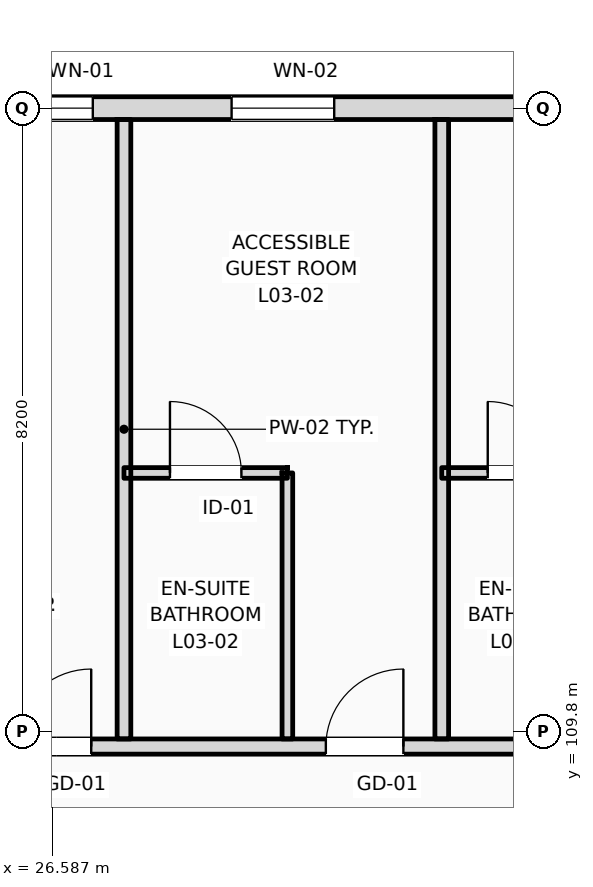
"""IFC4 building model, lengths in metres.
Left out: names, types, materials, properties, quantities, classifications, styles, units other than length and angle.
Written with IfcOpenShell. Run it as: python <this file> out.ifc"""

import sys

from ifc_helpers import new_model, si_unit, direction, frame, frame_2d, origin, place, context, subcontext, project, spatial, rectangle, extrude, element, fill, save


model = new_model("IFC4")
c1 = context("Model", 3, precision=1e-05, world=origin(), true_north=direction((0.0, 1.0)))
c2 = subcontext(c1, "Body", "Model", "MODEL_VIEW")
j1 = project(units=[si_unit("LENGTHUNIT", "METRE"), si_unit("PLANEANGLEUNIT", "RADIAN")], contexts=[c1])
p1 = place(None, origin())
s1 = spatial("IfcSite", under=j1, at=p1, CompositionType="ELEMENT")
p2 = place(p1, origin())
s2 = spatial("IfcBuilding", under=s1, at=p2, CompositionType="ELEMENT")
p3 = place(p2, frame((0.0, 0.0, 16.2)))
s3 = spatial("IfcBuildingStorey", under=s2, at=p3, CompositionType="ELEMENT", Elevation=16.2)
p4 = place(p3, frame((22.5, 118.0, 0.0), z_axis=(0.0, 0.0, 1.0), x_axis=(1.0, 0.0, 0.0)))
e1 = element("IfcWall", 1, at=p4, inside=s3, PredefinedType="STANDARD", context=c2, shape_type="SweptSolid", body=[
    extrude(rectangle(XDim=97.5, YDim=0.3, at=frame_2d((48.75, 0.0))), origin(), (0.0, 0.0, 1.0), 3.36),
])
p5 = place(p4, frame((3.721, 0.0, 0.9)))
e2 = element("IfcOpeningElement", 2, at=p5, cuts=e1, PredefinedType="OPENING", context=c2, shape_type="SweptSolid", body=[
    extrude(rectangle(XDim=0.9, YDim=1.8, at=frame_2d((0.45, 0.9))), frame((0.0, 0.16, 0.0), z_axis=(0.0, -1.0, 0.0), x_axis=(1.0, 0.0, 0.0)), (0.0, 0.0, 1.0), 0.32),
])
p6 = place(p4, frame((6.447, 0.0, 0.9)))
e3 = element("IfcOpeningElement", 3, at=p6, cuts=e1, PredefinedType="OPENING", context=c2, shape_type="SweptSolid", body=[
    extrude(rectangle(XDim=1.35, YDim=1.85, at=frame_2d((0.675, 0.925))), frame((0.0, 0.16, 0.0), z_axis=(0.0, -1.0, 0.0), x_axis=(1.0, 0.0, 0.0)), (0.0, 0.0, 1.0), 0.32),
])
p7 = place(p4, frame((11.363, 0.0, 0.9)))
e4 = element("IfcOpeningElement", 4, at=p7, cuts=e1, PredefinedType="OPENING", context=c2, shape_type="SweptSolid", body=[
    extrude(rectangle(XDim=1.5, YDim=1.9, at=frame_2d((0.75, 0.95))), frame((0.0, 0.16, 0.0), z_axis=(0.0, -1.0, 0.0), x_axis=(1.0, 0.0, 0.0)), (0.0, 0.0, 1.0), 0.32),
])
p8 = place(p4, frame((15.078, 0.0, 0.9)))
e5 = element("IfcOpeningElement", 5, at=p8, cuts=e1, PredefinedType="OPENING", context=c2, shape_type="SweptSolid", body=[
    extrude(rectangle(XDim=1.65, YDim=1.95, at=frame_2d((0.825, 0.975))), frame((0.0, 0.16, 0.0), z_axis=(0.0, -1.0, 0.0), x_axis=(1.0, 0.0, 0.0)), (0.0, 0.0, 1.0), 0.32),
])
p9 = place(p4, frame((19.395, 0.0, 0.9)))
e6 = element("IfcOpeningElement", 6, at=p9, cuts=e1, PredefinedType="OPENING", context=c2, shape_type="SweptSolid", body=[
    extrude(rectangle(XDim=1.8, YDim=2.0, at=frame_2d((0.9, 1.0))), frame((0.0, 0.16, 0.0), z_axis=(0.0, -1.0, 0.0), x_axis=(1.0, 0.0, 0.0)), (0.0, 0.0, 1.0), 0.32),
])
p10 = place(p4, frame((23.31, 0.0, 0.9)))
e7 = element("IfcOpeningElement", 7, at=p10, cuts=e1, PredefinedType="OPENING", context=c2, shape_type="SweptSolid", body=[
    extrude(rectangle(XDim=1.95, YDim=2.05, at=frame_2d((0.975, 1.025))), frame((0.0, 0.16, 0.0), z_axis=(0.0, -1.0, 0.0), x_axis=(1.0, 0.0, 0.0)), (0.0, 0.0, 1.0), 0.32),
])
p11 = place(p4, frame((28.026, 0.0, 0.9)))
e8 = element("IfcOpeningElement", 8, at=p11, cuts=e1, PredefinedType="OPENING", context=c2, shape_type="SweptSolid", body=[
    extrude(rectangle(XDim=2.1, YDim=2.1, at=frame_2d((1.05, 1.05))), frame((0.0, 0.16, 0.0), z_axis=(0.0, -1.0, 0.0), x_axis=(1.0, 0.0, 0.0)), (0.0, 0.0, 1.0), 0.32),
])
p12 = place(p4, frame((31.941, 0.0, 0.9)))
e9 = element("IfcOpeningElement", 9, at=p12, cuts=e1, PredefinedType="OPENING", context=c2, shape_type="SweptSolid", body=[
    extrude(rectangle(XDim=1.1, YDim=2.15, at=frame_2d((0.55, 1.075))), frame((0.0, 0.16, 0.0), z_axis=(0.0, -1.0, 0.0), x_axis=(1.0, 0.0, 0.0)), (0.0, 0.0, 1.0), 0.32),
])
p13 = place(p4, frame((36.657, 0.0, 0.9)))
e10 = element("IfcOpeningElement", 10, at=p13, cuts=e1, PredefinedType="OPENING", context=c2, shape_type="SweptSolid", body=[
    extrude(rectangle(XDim=2.4, YDim=2.2, at=frame_2d((1.2, 1.1))), frame((0.0, 0.16, 0.0), z_axis=(0.0, -1.0, 0.0), x_axis=(1.0, 0.0, 0.0)), (0.0, 0.0, 1.0), 0.32),
])
p14 = place(p4, frame((42.574, 0.0, 0.9)))
e11 = element("IfcOpeningElement", 11, at=p14, cuts=e1, PredefinedType="OPENING", context=c2, shape_type="SweptSolid", body=[
    extrude(rectangle(XDim=1.35, YDim=2.25, at=frame_2d((0.675, 1.125))), frame((0.0, 0.16, 0.0), z_axis=(0.0, -1.0, 0.0), x_axis=(1.0, 0.0, 0.0)), (0.0, 0.0, 1.0), 0.32),
])
p15 = place(p4, frame((45.289, 0.0, 0.9)))
e12 = element("IfcOpeningElement", 12, at=p15, cuts=e1, PredefinedType="OPENING", context=c2, shape_type="SweptSolid", body=[
    extrude(rectangle(XDim=2.7, YDim=2.28, at=frame_2d((1.35, 1.14))), frame((0.0, 0.16, 0.0), z_axis=(0.0, -1.0, 0.0), x_axis=(1.0, 0.0, 0.0)), (0.0, 0.0, 1.0), 0.32),
])
p16 = place(p4, frame((50.406, 0.0, 0.9)))
e13 = element("IfcOpeningElement", 13, at=p16, cuts=e1, PredefinedType="OPENING", context=c2, shape_type="SweptSolid", body=[
    extrude(rectangle(XDim=1.8, YDim=2.28, at=frame_2d((0.9, 1.14))), frame((0.0, 0.16, 0.0), z_axis=(0.0, -1.0, 0.0), x_axis=(1.0, 0.0, 0.0)), (0.0, 0.0, 1.0), 0.32),
])
p17 = place(p4, frame((53.922, 0.0, 0.9)))
e14 = element("IfcOpeningElement", 14, at=p17, cuts=e1, PredefinedType="OPENING", context=c2, shape_type="SweptSolid", body=[
    extrude(rectangle(XDim=1.8, YDim=2.28, at=frame_2d((0.9, 1.14))), frame((0.0, 0.16, 0.0), z_axis=(0.0, -1.0, 0.0), x_axis=(1.0, 0.0, 0.0)), (0.0, 0.0, 1.0), 0.32),
])
p18 = place(p4, frame((58.332, 0.0, 0.9)))
e15 = element("IfcOpeningElement", 15, at=p18, cuts=e1, PredefinedType="OPENING", context=c2, shape_type="SweptSolid", body=[
    extrude(rectangle(XDim=2.961, YDim=2.28, at=frame_2d((1.48, 1.14))), frame((0.0, 0.16, 0.0), z_axis=(0.0, -1.0, 0.0), x_axis=(1.0, 0.0, 0.0)), (0.0, 0.0, 1.0), 0.32),
])
p19 = place(p4, frame((62.513, 0.0, 0.9)))
e16 = element("IfcOpeningElement", 16, at=p19, cuts=e1, PredefinedType="OPENING", context=c2, shape_type="SweptSolid", body=[
    extrude(rectangle(XDim=1.8, YDim=2.28, at=frame_2d((0.9, 1.14))), frame((0.0, 0.16, 0.0), z_axis=(0.0, -1.0, 0.0), x_axis=(1.0, 0.0, 0.0)), (0.0, 0.0, 1.0), 0.32),
])
p20 = place(p4, frame((67.114, 0.0, 0.9)))
e17 = element("IfcOpeningElement", 17, at=p20, cuts=e1, PredefinedType="OPENING", context=c2, shape_type="SweptSolid", body=[
    extrude(rectangle(XDim=2.961, YDim=2.28, at=frame_2d((1.48, 1.14))), frame((0.0, 0.16, 0.0), z_axis=(0.0, -1.0, 0.0), x_axis=(1.0, 0.0, 0.0)), (0.0, 0.0, 1.0), 0.32),
])
p21 = place(p4, frame((73.695, 0.0, 0.9)))
e18 = element("IfcOpeningElement", 18, at=p21, cuts=e1, PredefinedType="OPENING", context=c2, shape_type="SweptSolid", body=[
    extrude(rectangle(XDim=1.1, YDim=2.28, at=frame_2d((0.55, 1.14))), frame((0.0, 0.16, 0.0), z_axis=(0.0, -1.0, 0.0), x_axis=(1.0, 0.0, 0.0)), (0.0, 0.0, 1.0), 0.32),
])
p22 = place(p4, frame((75.895, 0.0, 0.9)))
e19 = element("IfcOpeningElement", 19, at=p22, cuts=e1, PredefinedType="OPENING", context=c2, shape_type="SweptSolid", body=[
    extrude(rectangle(XDim=2.961, YDim=2.28, at=frame_2d((1.48, 1.14))), frame((0.0, 0.16, 0.0), z_axis=(0.0, -1.0, 0.0), x_axis=(1.0, 0.0, 0.0)), (0.0, 0.0, 1.0), 0.32),
])
p23 = place(p4, frame((81.676, 0.0, 0.9)))
e20 = element("IfcOpeningElement", 20, at=p23, cuts=e1, PredefinedType="OPENING", context=c2, shape_type="SweptSolid", body=[
    extrude(rectangle(XDim=1.8, YDim=2.28, at=frame_2d((0.9, 1.14))), frame((0.0, 0.16, 0.0), z_axis=(0.0, -1.0, 0.0), x_axis=(1.0, 0.0, 0.0)), (0.0, 0.0, 1.0), 0.32),
])
p24 = place(p4, frame((84.677, 0.0, 0.9)))
e21 = element("IfcOpeningElement", 21, at=p24, cuts=e1, PredefinedType="OPENING", context=c2, shape_type="SweptSolid", body=[
    extrude(rectangle(XDim=2.961, YDim=2.28, at=frame_2d((1.48, 1.14))), frame((0.0, 0.16, 0.0), z_axis=(0.0, -1.0, 0.0), x_axis=(1.0, 0.0, 0.0)), (0.0, 0.0, 1.0), 0.32),
])
p25 = place(p4, frame((89.999, 0.0, 0.9)))
e22 = element("IfcOpeningElement", 22, at=p25, cuts=e1, PredefinedType="OPENING", context=c2, shape_type="SweptSolid", body=[
    extrude(rectangle(XDim=1.1, YDim=1.5, at=frame_2d((0.55, 0.75))), frame((0.0, 0.16, 0.0), z_axis=(0.0, -1.0, 0.0), x_axis=(1.0, 0.0, 0.0)), (0.0, 0.0, 1.0), 0.32),
])
p26 = place(p4, frame((94.35, 0.0, 0.9)))
e23 = element("IfcOpeningElement", 23, at=p26, cuts=e1, PredefinedType="OPENING", context=c2, shape_type="SweptSolid", body=[
    extrude(rectangle(XDim=1.25, YDim=1.6, at=frame_2d((0.625, 0.8))), frame((0.0, 0.16, 0.0), z_axis=(0.0, -1.0, 0.0), x_axis=(1.0, 0.0, 0.0)), (0.0, 0.0, 1.0), 0.32),
])
p27 = place(p3, frame((10.65, 109.6, 0.0), z_axis=(0.0, 0.0, 1.0), x_axis=(1.0, 0.0, 0.0)))
e24 = element("IfcWall", 24, at=p27, inside=s3, PredefinedType="PARTITIONING", context=c2, shape_type="SweptSolid", body=[
    extrude(rectangle(XDim=109.21, YDim=0.2, at=frame_2d((54.605, 0.0))), origin(), (0.0, 0.0, 1.0), 3.36),
])
p28 = place(p27, frame((15.43, 0.0, 0.0)))
e25 = element("IfcOpeningElement", 25, at=p28, cuts=e24, PredefinedType="OPENING", context=c2, shape_type="SweptSolid", body=[
    extrude(rectangle(XDim=1.02, YDim=2.2, at=frame_2d((0.51, 1.1))), frame((0.0, 0.11, 0.0), z_axis=(0.0, -1.0, 0.0), x_axis=(1.0, 0.0, 0.0)), (0.0, 0.0, 1.0), 0.22),
])
p29 = place(p27, frame((19.537, 0.0, 0.0)))
e26 = element("IfcOpeningElement", 26, at=p29, cuts=e24, PredefinedType="OPENING", context=c2, shape_type="SweptSolid", body=[
    extrude(rectangle(XDim=1.02, YDim=2.2, at=frame_2d((0.51, 1.1))), frame((0.0, 0.11, 0.0), z_axis=(0.0, -1.0, 0.0), x_axis=(1.0, 0.0, 0.0)), (0.0, 0.0, 1.0), 0.22),
])
p30 = place(p27, frame((23.928, 0.0, 0.0)))
e27 = element("IfcOpeningElement", 27, at=p30, cuts=e24, PredefinedType="OPENING", context=c2, shape_type="SweptSolid", body=[
    extrude(rectangle(XDim=1.02, YDim=2.2, at=frame_2d((0.51, 1.1))), frame((0.0, 0.11, 0.0), z_axis=(0.0, -1.0, 0.0), x_axis=(1.0, 0.0, 0.0)), (0.0, 0.0, 1.0), 0.22),
])
p31 = place(p27, frame((26.169, 0.0, 0.0)))
e28 = element("IfcOpeningElement", 28, at=p31, cuts=e24, PredefinedType="OPENING", context=c2, shape_type="SweptSolid", body=[
    extrude(rectangle(XDim=1.02, YDim=2.2, at=frame_2d((0.51, 1.1))), frame((0.0, 0.11, 0.0), z_axis=(0.0, -1.0, 0.0), x_axis=(1.0, 0.0, 0.0)), (0.0, 0.0, 1.0), 0.22),
])
p32 = place(p27, frame((32.739, 0.0, 0.0)))
e29 = element("IfcOpeningElement", 29, at=p32, cuts=e24, PredefinedType="OPENING", context=c2, shape_type="SweptSolid", body=[
    extrude(rectangle(XDim=0.96, YDim=2.2, at=frame_2d((0.48, 1.1))), frame((0.0, 0.11, 0.0), z_axis=(0.0, -1.0, 0.0), x_axis=(1.0, 0.0, 0.0)), (0.0, 0.0, 1.0), 0.22),
])
p33 = place(p27, frame((34.98, 0.0, 0.0)))
e30 = element("IfcOpeningElement", 30, at=p33, cuts=e24, PredefinedType="OPENING", context=c2, shape_type="SweptSolid", body=[
    extrude(rectangle(XDim=0.96, YDim=2.2, at=frame_2d((0.48, 1.1))), frame((0.0, 0.11, 0.0), z_axis=(0.0, -1.0, 0.0), x_axis=(1.0, 0.0, 0.0)), (0.0, 0.0, 1.0), 0.22),
])
p34 = place(p27, frame((41.521, 0.0, 0.0)))
e31 = element("IfcOpeningElement", 31, at=p34, cuts=e24, PredefinedType="OPENING", context=c2, shape_type="SweptSolid", body=[
    extrude(rectangle(XDim=0.96, YDim=2.2, at=frame_2d((0.48, 1.1))), frame((0.0, 0.11, 0.0), z_axis=(0.0, -1.0, 0.0), x_axis=(1.0, 0.0, 0.0)), (0.0, 0.0, 1.0), 0.22),
])
p35 = place(p27, frame((43.512, 0.0, 0.0)))
e32 = element("IfcOpeningElement", 32, at=p35, cuts=e24, PredefinedType="OPENING", context=c2, shape_type="SweptSolid", body=[
    extrude(rectangle(XDim=0.96, YDim=2.2, at=frame_2d((0.48, 1.1))), frame((0.0, 0.11, 0.0), z_axis=(0.0, -1.0, 0.0), x_axis=(1.0, 0.0, 0.0)), (0.0, 0.0, 1.0), 0.22),
])
p36 = place(p27, frame((50.303, 0.0, 0.0)))
e33 = element("IfcOpeningElement", 33, at=p36, cuts=e24, PredefinedType="OPENING", context=c2, shape_type="SweptSolid", body=[
    extrude(rectangle(XDim=0.96, YDim=2.2, at=frame_2d((0.48, 1.1))), frame((0.0, 0.11, 0.0), z_axis=(0.0, -1.0, 0.0), x_axis=(1.0, 0.0, 0.0)), (0.0, 0.0, 1.0), 0.22),
])
p37 = place(p27, frame((54.944, 0.0, 0.0)))
e34 = element("IfcOpeningElement", 34, at=p37, cuts=e24, PredefinedType="OPENING", context=c2, shape_type="SweptSolid", body=[
    extrude(rectangle(XDim=0.96, YDim=2.2, at=frame_2d((0.48, 1.1))), frame((0.0, 0.11, 0.0), z_axis=(0.0, -1.0, 0.0), x_axis=(1.0, 0.0, 0.0)), (0.0, 0.0, 1.0), 0.22),
])
p38 = place(p27, frame((59.085, 0.0, 0.0)))
e35 = element("IfcOpeningElement", 35, at=p38, cuts=e24, PredefinedType="OPENING", context=c2, shape_type="SweptSolid", body=[
    extrude(rectangle(XDim=0.96, YDim=2.2, at=frame_2d((0.48, 1.1))), frame((0.0, 0.11, 0.0), z_axis=(0.0, -1.0, 0.0), x_axis=(1.0, 0.0, 0.0)), (0.0, 0.0, 1.0), 0.22),
])
p39 = place(p27, frame((63.476, 0.0, 0.0)))
e36 = element("IfcOpeningElement", 36, at=p39, cuts=e24, PredefinedType="OPENING", context=c2, shape_type="SweptSolid", body=[
    extrude(rectangle(XDim=0.96, YDim=2.2, at=frame_2d((0.48, 1.1))), frame((0.0, 0.11, 0.0), z_axis=(0.0, -1.0, 0.0), x_axis=(1.0, 0.0, 0.0)), (0.0, 0.0, 1.0), 0.22),
])
p40 = place(p27, frame((65.716, 0.0, 0.0)))
e37 = element("IfcOpeningElement", 37, at=p40, cuts=e24, PredefinedType="OPENING", context=c2, shape_type="SweptSolid", body=[
    extrude(rectangle(XDim=0.96, YDim=2.2, at=frame_2d((0.48, 1.1))), frame((0.0, 0.11, 0.0), z_axis=(0.0, -1.0, 0.0), x_axis=(1.0, 0.0, 0.0)), (0.0, 0.0, 1.0), 0.22),
])
p41 = place(p27, frame((72.257, 0.0, 0.0)))
e38 = element("IfcOpeningElement", 38, at=p41, cuts=e24, PredefinedType="OPENING", context=c2, shape_type="SweptSolid", body=[
    extrude(rectangle(XDim=0.96, YDim=2.2, at=frame_2d((0.48, 1.1))), frame((0.0, 0.11, 0.0), z_axis=(0.0, -1.0, 0.0), x_axis=(1.0, 0.0, 0.0)), (0.0, 0.0, 1.0), 0.22),
])
p42 = place(p27, frame((74.498, 0.0, 0.0)))
e39 = element("IfcOpeningElement", 39, at=p42, cuts=e24, PredefinedType="OPENING", context=c2, shape_type="SweptSolid", body=[
    extrude(rectangle(XDim=0.96, YDim=2.2, at=frame_2d((0.48, 1.1))), frame((0.0, 0.11, 0.0), z_axis=(0.0, -1.0, 0.0), x_axis=(1.0, 0.0, 0.0)), (0.0, 0.0, 1.0), 0.22),
])
p43 = place(p27, frame((81.039, 0.0, 0.0)))
e40 = element("IfcOpeningElement", 40, at=p43, cuts=e24, PredefinedType="OPENING", context=c2, shape_type="SweptSolid", body=[
    extrude(rectangle(XDim=0.96, YDim=2.2, at=frame_2d((0.48, 1.1))), frame((0.0, 0.11, 0.0), z_axis=(0.0, -1.0, 0.0), x_axis=(1.0, 0.0, 0.0)), (0.0, 0.0, 1.0), 0.22),
])
p44 = place(p27, frame((85.68, 0.0, 0.0)))
e41 = element("IfcOpeningElement", 41, at=p44, cuts=e24, PredefinedType="OPENING", context=c2, shape_type="SweptSolid", body=[
    extrude(rectangle(XDim=0.96, YDim=2.2, at=frame_2d((0.48, 1.1))), frame((0.0, 0.11, 0.0), z_axis=(0.0, -1.0, 0.0), x_axis=(1.0, 0.0, 0.0)), (0.0, 0.0, 1.0), 0.22),
])
p45 = place(p27, frame((89.82, 0.0, 0.0)))
e42 = element("IfcOpeningElement", 42, at=p45, cuts=e24, PredefinedType="OPENING", context=c2, shape_type="SweptSolid", body=[
    extrude(rectangle(XDim=0.96, YDim=2.2, at=frame_2d((0.48, 1.1))), frame((0.0, 0.11, 0.0), z_axis=(0.0, -1.0, 0.0), x_axis=(1.0, 0.0, 0.0)), (0.0, 0.0, 1.0), 0.22),
])
p46 = place(p27, frame((94.211, 0.0, 0.0)))
e43 = element("IfcOpeningElement", 43, at=p46, cuts=e24, PredefinedType="OPENING", context=c2, shape_type="SweptSolid", body=[
    extrude(rectangle(XDim=0.96, YDim=2.2, at=frame_2d((0.48, 1.1))), frame((0.0, 0.11, 0.0), z_axis=(0.0, -1.0, 0.0), x_axis=(1.0, 0.0, 0.0)), (0.0, 0.0, 1.0), 0.22),
])
p47 = place(p27, frame((98.602, 0.0, 0.0)))
e44 = element("IfcOpeningElement", 44, at=p47, cuts=e24, PredefinedType="OPENING", context=c2, shape_type="SweptSolid", body=[
    extrude(rectangle(XDim=0.96, YDim=2.2, at=frame_2d((0.48, 1.1))), frame((0.0, 0.11, 0.0), z_axis=(0.0, -1.0, 0.0), x_axis=(1.0, 0.0, 0.0)), (0.0, 0.0, 1.0), 0.22),
])
p48 = place(p27, frame((102.993, 0.0, 0.0)))
e45 = element("IfcOpeningElement", 45, at=p48, cuts=e24, PredefinedType="OPENING", context=c2, shape_type="SweptSolid", body=[
    extrude(rectangle(XDim=0.96, YDim=2.2, at=frame_2d((0.48, 1.1))), frame((0.0, 0.11, 0.0), z_axis=(0.0, -1.0, 0.0), x_axis=(1.0, 0.0, 0.0)), (0.0, 0.0, 1.0), 0.22),
])
p49 = place(p27, frame((105.269, 0.0, 0.0)))
e46 = element("IfcOpeningElement", 46, at=p49, cuts=e24, PredefinedType="OPENING", context=c2, shape_type="SweptSolid", body=[
    extrude(rectangle(XDim=0.96, YDim=2.2, at=frame_2d((0.48, 1.1))), frame((0.0, 0.11, 0.0), z_axis=(0.0, -1.0, 0.0), x_axis=(1.0, 0.0, 0.0)), (0.0, 0.0, 1.0), 0.22),
])
p50 = place(p27, frame((2.716, 0.0, 0.0)))
e47 = element("IfcOpeningElement", 47, at=p50, cuts=e24, PredefinedType="OPENING", context=c2, shape_type="SweptSolid", body=[
    extrude(rectangle(XDim=1.35, YDim=2.25, at=frame_2d((0.675, 1.125))), frame((0.0, 0.11, 0.0), z_axis=(0.0, -1.0, 0.0), x_axis=(1.0, 0.0, 0.0)), (0.0, 0.0, 1.0), 0.22),
])
p51 = place(p27, frame((6.65, 0.0, 0.0)))
e48 = element("IfcOpeningElement", 48, at=p51, cuts=e24, PredefinedType="OPENING", context=c2, shape_type="SweptSolid", body=[
    extrude(rectangle(XDim=1.35, YDim=2.25, at=frame_2d((0.675, 1.125))), frame((0.0, 0.11, 0.0), z_axis=(0.0, -1.0, 0.0), x_axis=(1.0, 0.0, 0.0)), (0.0, 0.0, 1.0), 0.22),
])
p52 = place(p27, frame((10.583, 0.0, 0.0)))
e49 = element("IfcOpeningElement", 49, at=p52, cuts=e24, PredefinedType="OPENING", context=c2, shape_type="SweptSolid", body=[
    extrude(rectangle(XDim=1.35, YDim=2.25, at=frame_2d((0.675, 1.125))), frame((0.0, 0.11, 0.0), z_axis=(0.0, -1.0, 0.0), x_axis=(1.0, 0.0, 0.0)), (0.0, 0.0, 1.0), 0.22),
])
for number, where, z_axis, x_axis in (
    (50, (27.531, 109.7, 0.0), (0.0, 0.0, 1.0), (0.0, 1.0, 0.0)),
    (51, (31.712, 109.7, 0.0), (0.0, 0.0, 1.0), (0.0, 1.0, 0.0)),
):
    element("IfcWall", number, at=place(p3, frame(where, z_axis=z_axis, x_axis=x_axis)), inside=s3, PredefinedType="PARTITIONING", context=c2, shape_type="SweptSolid", body=[
        extrude(rectangle(XDim=8.15, YDim=0.18, at=frame_2d((4.075, 0.0))), origin(), (0.0, 0.0, 1.0), 3.92),
    ])
p53 = place(p3, frame((29.681, 109.7, 0.0), z_axis=(0.0, 0.0, 1.0), x_axis=(0.0, 1.0, 0.0)))
e52 = element("IfcWall", 52, at=p53, inside=s3, PredefinedType="PARTITIONING", context=c2, shape_type="SweptSolid", body=[
    extrude(rectangle(XDim=3.5, YDim=0.14, at=frame_2d((1.75, 0.0))), origin(), (0.0, 0.0, 1.0), 3.92),
])
p54 = place(p3, frame((27.531, 113.2, 0.0), z_axis=(0.0, 0.0, 1.0), x_axis=(1.0, 0.0, 0.0)))
e53 = element("IfcWall", 53, at=p54, inside=s3, PredefinedType="PARTITIONING", context=c2, shape_type="SweptSolid", body=[
    extrude(rectangle(XDim=2.15, YDim=0.14, at=frame_2d((1.075, 0.0))), origin(), (0.0, 0.0, 1.0), 3.92),
])
p55 = place(p54, frame((0.605, 0.0, 0.0)))
e54 = element("IfcOpeningElement", 54, at=p55, cuts=e53, PredefinedType="OPENING", context=c2, shape_type="SweptSolid", body=[
    extrude(rectangle(XDim=0.94, YDim=2.15, at=frame_2d((0.47, 1.075))), frame((0.0, 0.08, 0.0), z_axis=(0.0, -1.0, 0.0), x_axis=(1.0, 0.0, 0.0)), (0.0, 0.0, 1.0), 0.16),
])
p56 = place(p3, frame((31.712, 113.2, 0.0), z_axis=(0.0, 0.0, 1.0), x_axis=(1.0, 0.0, 0.0)))
e55 = element("IfcWall", 55, at=p56, inside=s3, PredefinedType="PARTITIONING", context=c2, shape_type="SweptSolid", body=[
    extrude(rectangle(XDim=2.15, YDim=0.14, at=frame_2d((1.075, 0.0))), origin(), (0.0, 0.0, 1.0), 3.92),
])
p57 = place(p56, frame((0.605, 0.0, 0.0)))
e56 = element("IfcOpeningElement", 56, at=p57, cuts=e55, PredefinedType="OPENING", context=c2, shape_type="SweptSolid", body=[
    extrude(rectangle(XDim=0.94, YDim=2.15, at=frame_2d((0.47, 1.075))), frame((0.0, 0.08, 0.0), z_axis=(0.0, -1.0, 0.0), x_axis=(1.0, 0.0, 0.0)), (0.0, 0.0, 1.0), 0.16),
])
p58 = place(p5, origin())
e57 = element("IfcWindow", 57, at=p58, inside=s3, PartitioningType="DOUBLE_PANEL_VERTICAL", PredefinedType="WINDOW", context=c2, shape_type="SweptSolid", body=[
    extrude(rectangle(XDim=0.9, YDim=1.8, at=frame_2d((0.45, 0.9))), frame((0.0, 0.03, 0.0), z_axis=(0.0, -1.0, 0.0), x_axis=(1.0, 0.0, 0.0)), (0.0, 0.0, 1.0), 0.06),
])
fill(e2, e57)
p59 = place(p6, origin())
e58 = element("IfcWindow", 58, at=p59, inside=s3, PartitioningType="DOUBLE_PANEL_VERTICAL", PredefinedType="WINDOW", context=c2, shape_type="SweptSolid", body=[
    extrude(rectangle(XDim=1.35, YDim=1.85, at=frame_2d((0.675, 0.925))), frame((0.0, 0.03, 0.0), z_axis=(0.0, -1.0, 0.0), x_axis=(1.0, 0.0, 0.0)), (0.0, 0.0, 1.0), 0.06),
])
fill(e3, e58)
p60 = place(p28, origin())
e59 = element("IfcDoor", 59, at=p60, inside=s3, OperationType="SINGLE_SWING_RIGHT", PredefinedType="DOOR", context=c2, shape_type="SweptSolid", body=[
    extrude(rectangle(XDim=1.02, YDim=2.2, at=frame_2d((0.51, 1.1))), frame((0.0, 0.025, 0.0), z_axis=(0.0, -1.0, 0.0), x_axis=(1.0, 0.0, 0.0)), (0.0, 0.0, 1.0), 0.05),
])
fill(e25, e59)
p61 = place(p29, origin())
e60 = element("IfcDoor", 60, at=p61, inside=s3, OperationType="SINGLE_SWING_RIGHT", PredefinedType="DOOR", context=c2, shape_type="SweptSolid", body=[
    extrude(rectangle(XDim=1.02, YDim=2.2, at=frame_2d((0.51, 1.1))), frame((0.0, 0.025, 0.0), z_axis=(0.0, -1.0, 0.0), x_axis=(1.0, 0.0, 0.0)), (0.0, 0.0, 1.0), 0.05),
])
fill(e26, e60)
p62 = place(p55, origin())
e61 = element("IfcDoor", 61, at=p62, inside=s3, OperationType="SINGLE_SWING_LEFT", PredefinedType="DOOR", context=c2, shape_type="SweptSolid", body=[
    extrude(rectangle(XDim=0.94, YDim=2.15, at=frame_2d((0.47, 1.075))), frame((0.0, 0.025, 0.0), z_axis=(0.0, -1.0, 0.0), x_axis=(1.0, 0.0, 0.0)), (0.0, 0.0, 1.0), 0.05),
])
fill(e54, e61)
p63 = place(p57, origin())
e62 = element("IfcDoor", 62, at=p63, inside=s3, OperationType="SINGLE_SWING_LEFT", PredefinedType="DOOR", context=c2, shape_type="SweptSolid", body=[
    extrude(rectangle(XDim=0.94, YDim=2.15, at=frame_2d((0.47, 1.075))), frame((0.0, 0.025, 0.0), z_axis=(0.0, -1.0, 0.0), x_axis=(1.0, 0.0, 0.0)), (0.0, 0.0, 1.0), 0.05),
])
fill(e56, e62)
save(model, sys.argv[1])
